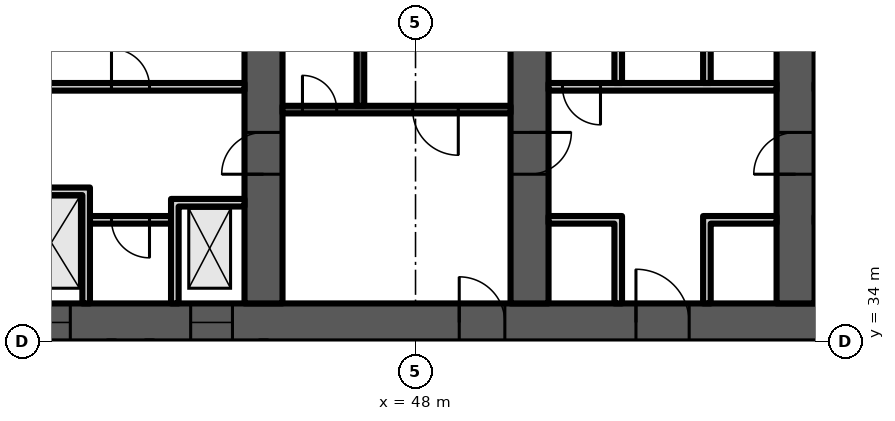
"""IFC4 building model, lengths in metres.
Left out: names, types, materials, properties, quantities, classifications, styles, units other than length and angle.
Written with IfcOpenShell. Run it as: python <this file> out.ifc"""

import sys

from ifc_helpers import new_model, si_unit, direction, frame, frame_2d, origin, place, context, subcontext, project, spatial, polyline, rectangle, outline, extrude, element, fill, save


model = new_model("IFC4")
c1 = context("Model", 3, precision=1e-05, world=origin(), true_north=direction((0.0, 1.0)))
c2 = subcontext(c1, "Body", "Model", "MODEL_VIEW")
j1 = project(units=[si_unit("LENGTHUNIT", "METRE"), si_unit("PLANEANGLEUNIT", "RADIAN")], contexts=[c1])
p1 = place(None, origin())
s1 = spatial("IfcSite", under=j1, at=p1, CompositionType="ELEMENT")
p2 = place(p1, origin())
s2 = spatial("IfcBuilding", under=s1, at=p2, CompositionType="ELEMENT")
p3 = place(p2, frame((0.0, 0.0, 121.9)))
s3 = spatial("IfcBuildingStorey", under=s2, at=p3, CompositionType="ELEMENT", Elevation=121.9)
p4 = place(p3, frame((16.0, 34.5, 0.0), z_axis=(0.0, 0.0, 1.0), x_axis=(1.0, 0.0, 0.0)))
e1 = element("IfcWall", 1, at=p4, inside=s3, PredefinedType="SHEAR", context=c2, shape_type="SweptSolid", body=[
    extrude(rectangle(XDim=49.0, YDim=1.0, at=frame_2d((24.5, 0.0))), origin(), (0.0, 0.0, 1.0), 3.6),
])
p5 = place(p4, frame((1.2, 0.0, 0.0)))
e2 = element("IfcOpeningElement", 2, at=p5, cuts=e1, PredefinedType="OPENING", context=c2, shape_type="SweptSolid", body=[
    extrude(rectangle(XDim=1.1, YDim=2.1, at=frame_2d((0.55, 1.05))), frame((0.0, 0.51, 0.0), z_axis=(0.0, -1.0, 0.0), x_axis=(1.0, 0.0, 0.0)), (0.0, 0.0, 1.0), 1.02),
])
p6 = place(p4, frame((5.083, 0.0, 0.0)))
e3 = element("IfcOpeningElement", 3, at=p6, cuts=e1, PredefinedType="OPENING", context=c2, shape_type="SweptSolid", body=[
    extrude(rectangle(XDim=1.1, YDim=2.1, at=frame_2d((0.55, 1.05))), frame((0.0, 0.51, 0.0), z_axis=(0.0, -1.0, 0.0), x_axis=(1.0, 0.0, 0.0)), (0.0, 0.0, 1.0), 1.02),
])
p7 = place(p4, frame((2.933, 0.0, 0.0)))
e4 = element("IfcOpeningElement", 4, at=p7, cuts=e1, PredefinedType="OPENING", context=c2, shape_type="SweptSolid", body=[
    extrude(rectangle(XDim=1.4, YDim=2.1, at=frame_2d((0.7, 1.05))), frame((0.0, 0.51, 0.0), z_axis=(0.0, -1.0, 0.0), x_axis=(1.0, 0.0, 0.0)), (0.0, 0.0, 1.0), 1.02),
])
p8 = place(p4, frame((7.65, 0.0, 0.0)))
e5 = element("IfcOpeningElement", 5, at=p8, cuts=e1, PredefinedType="OPENING", context=c2, shape_type="SweptSolid", body=[
    extrude(rectangle(XDim=1.2, YDim=2.1, at=frame_2d((0.6, 1.05))), frame((0.0, 0.51, 0.0), z_axis=(0.0, -1.0, 0.0), x_axis=(1.0, 0.0, 0.0)), (0.0, 0.0, 1.0), 1.02),
])
p9 = place(p4, frame((14.817, 0.0, 0.0)))
e6 = element("IfcOpeningElement", 6, at=p9, cuts=e1, PredefinedType="OPENING", context=c2, shape_type="SweptSolid", body=[
    extrude(rectangle(XDim=1.1, YDim=2.1, at=frame_2d((0.55, 1.05))), frame((0.0, 0.51, 0.0), z_axis=(0.0, -1.0, 0.0), x_axis=(1.0, 0.0, 0.0)), (0.0, 0.0, 1.0), 1.02),
])
p10 = place(p4, frame((19.083, 0.0, 0.0)))
e7 = element("IfcOpeningElement", 7, at=p10, cuts=e1, PredefinedType="OPENING", context=c2, shape_type="SweptSolid", body=[
    extrude(rectangle(XDim=1.1, YDim=2.1, at=frame_2d((0.55, 1.05))), frame((0.0, 0.51, 0.0), z_axis=(0.0, -1.0, 0.0), x_axis=(1.0, 0.0, 0.0)), (0.0, 0.0, 1.0), 1.02),
])
p11 = place(p4, frame((16.8, 0.0, 0.0)))
e8 = element("IfcOpeningElement", 8, at=p11, cuts=e1, PredefinedType="OPENING", context=c2, shape_type="SweptSolid", body=[
    extrude(rectangle(XDim=1.4, YDim=2.1, at=frame_2d((0.7, 1.05))), frame((0.0, 0.51, 0.0), z_axis=(0.0, -1.0, 0.0), x_axis=(1.0, 0.0, 0.0)), (0.0, 0.0, 1.0), 1.02),
])
p12 = place(p4, frame((21.817, 0.0, 0.0)))
e9 = element("IfcOpeningElement", 9, at=p12, cuts=e1, PredefinedType="OPENING", context=c2, shape_type="SweptSolid", body=[
    extrude(rectangle(XDim=1.1, YDim=2.1, at=frame_2d((0.55, 1.05))), frame((0.0, 0.51, 0.0), z_axis=(0.0, -1.0, 0.0), x_axis=(1.0, 0.0, 0.0)), (0.0, 0.0, 1.0), 1.02),
])
p13 = place(p4, frame((26.083, 0.0, 0.0)))
e10 = element("IfcOpeningElement", 10, at=p13, cuts=e1, PredefinedType="OPENING", context=c2, shape_type="SweptSolid", body=[
    extrude(rectangle(XDim=1.1, YDim=2.1, at=frame_2d((0.55, 1.05))), frame((0.0, 0.51, 0.0), z_axis=(0.0, -1.0, 0.0), x_axis=(1.0, 0.0, 0.0)), (0.0, 0.0, 1.0), 1.02),
])
p14 = place(p4, frame((33.15, 0.0, 0.0)))
e11 = element("IfcOpeningElement", 11, at=p14, cuts=e1, PredefinedType="OPENING", context=c2, shape_type="SweptSolid", body=[
    extrude(rectangle(XDim=1.2, YDim=2.1, at=frame_2d((0.6, 1.05))), frame((0.0, 0.51, 0.0), z_axis=(0.0, -1.0, 0.0), x_axis=(1.0, 0.0, 0.0)), (0.0, 0.0, 1.0), 1.02),
])
p15 = place(p4, frame((37.8, 0.0, 0.0)))
e12 = element("IfcOpeningElement", 12, at=p15, cuts=e1, PredefinedType="OPENING", context=c2, shape_type="SweptSolid", body=[
    extrude(rectangle(XDim=1.4, YDim=2.1, at=frame_2d((0.7, 1.05))), frame((0.0, 0.51, 0.0), z_axis=(0.0, -1.0, 0.0), x_axis=(1.0, 0.0, 0.0)), (0.0, 0.0, 1.0), 1.02),
])
p16 = place(p4, frame((42.817, 0.0, 0.0)))
e13 = element("IfcOpeningElement", 13, at=p16, cuts=e1, PredefinedType="OPENING", context=c2, shape_type="SweptSolid", body=[
    extrude(rectangle(XDim=1.1, YDim=2.1, at=frame_2d((0.55, 1.05))), frame((0.0, 0.51, 0.0), z_axis=(0.0, -1.0, 0.0), x_axis=(1.0, 0.0, 0.0)), (0.0, 0.0, 1.0), 1.02),
])
p17 = place(p4, frame((46.7, 0.0, 0.0)))
e14 = element("IfcOpeningElement", 14, at=p17, cuts=e1, PredefinedType="OPENING", context=c2, shape_type="SweptSolid", body=[
    extrude(rectangle(XDim=1.1, YDim=2.1, at=frame_2d((0.55, 1.05))), frame((0.0, 0.51, 0.0), z_axis=(0.0, -1.0, 0.0), x_axis=(1.0, 0.0, 0.0)), (0.0, 0.0, 1.0), 1.02),
])
p18 = place(p4, frame((44.667, 0.0, 0.0)))
e15 = element("IfcOpeningElement", 15, at=p18, cuts=e1, PredefinedType="OPENING", context=c2, shape_type="SweptSolid", body=[
    extrude(rectangle(XDim=1.4, YDim=2.1, at=frame_2d((0.7, 1.05))), frame((0.0, 0.51, 0.0), z_axis=(0.0, -1.0, 0.0), x_axis=(1.0, 0.0, 0.0)), (0.0, 0.0, 1.0), 1.02),
])
p19 = place(p3, frame((44.0, 35.0, 0.0), z_axis=(0.0, 0.0, 1.0), x_axis=(0.0, 1.0, 0.0)))
e16 = element("IfcWall", 16, at=p19, inside=s3, PredefinedType="SHEAR", context=c2, shape_type="SweptSolid", body=[
    extrude(rectangle(XDim=14.577, YDim=1.0, at=frame_2d((7.289, 0.0))), origin(), (0.0, 0.0, 1.0), 3.6),
])
p20 = place(p19, frame((3.4, 0.0, 0.0)))
e17 = element("IfcOpeningElement", 17, at=p20, cuts=e16, PredefinedType="OPENING", context=c2, shape_type="SweptSolid", body=[
    extrude(rectangle(XDim=1.1, YDim=2.1, at=frame_2d((0.55, 1.05))), frame((0.0, 0.51, 0.0), z_axis=(0.0, -1.0, 0.0), x_axis=(1.0, 0.0, 0.0)), (0.0, 0.0, 1.0), 1.02),
])
p21 = place(p19, frame((9.8, 0.0, 0.0)))
e18 = element("IfcOpeningElement", 18, at=p21, cuts=e16, PredefinedType="OPENING", context=c2, shape_type="SweptSolid", body=[
    extrude(rectangle(XDim=1.0, YDim=2.1, at=frame_2d((0.5, 1.05))), frame((0.0, 0.51, 0.0), z_axis=(0.0, -1.0, 0.0), x_axis=(1.0, 0.0, 0.0)), (0.0, 0.0, 1.0), 1.02),
])
p22 = place(p3, frame((51.0, 35.0, 0.0), z_axis=(0.0, 0.0, 1.0), x_axis=(0.0, 1.0, 0.0)))
e19 = element("IfcWall", 19, at=p22, inside=s3, PredefinedType="SHEAR", context=c2, shape_type="SweptSolid", body=[
    extrude(rectangle(XDim=13.965, YDim=1.0, at=frame_2d((6.982, 0.0))), origin(), (0.0, 0.0, 1.0), 3.6),
])
p23 = place(p22, frame((3.4, 0.0, 0.0)))
e20 = element("IfcOpeningElement", 20, at=p23, cuts=e19, PredefinedType="OPENING", context=c2, shape_type="SweptSolid", body=[
    extrude(rectangle(XDim=1.1, YDim=2.1, at=frame_2d((0.55, 1.05))), frame((0.0, 0.51, 0.0), z_axis=(0.0, -1.0, 0.0), x_axis=(1.0, 0.0, 0.0)), (0.0, 0.0, 1.0), 1.02),
])
p24 = place(p3, frame((58.0, 35.0, 0.0), z_axis=(0.0, 0.0, 1.0), x_axis=(0.0, 1.0, 0.0)))
e21 = element("IfcWall", 21, at=p24, inside=s3, PredefinedType="SHEAR", context=c2, shape_type="SweptSolid", body=[
    extrude(rectangle(XDim=13.352, YDim=1.0, at=frame_2d((6.676, 0.0))), origin(), (0.0, 0.0, 1.0), 3.6),
])
p25 = place(p24, frame((10.426, 0.0, 0.0)))
e22 = element("IfcOpeningElement", 22, at=p25, cuts=e21, PredefinedType="OPENING", context=c2, shape_type="SweptSolid", body=[
    extrude(rectangle(XDim=1.0, YDim=2.1, at=frame_2d((0.5, 1.05))), frame((0.0, 0.51, 0.0), z_axis=(0.0, -1.0, 0.0), x_axis=(1.0, 0.0, 0.0)), (0.0, 0.0, 1.0), 1.02),
])
p26 = place(p24, frame((3.4, 0.0, 0.0)))
e23 = element("IfcOpeningElement", 23, at=p26, cuts=e21, PredefinedType="OPENING", context=c2, shape_type="SweptSolid", body=[
    extrude(rectangle(XDim=1.1, YDim=2.1, at=frame_2d((0.55, 1.05))), frame((0.0, 0.51, 0.0), z_axis=(0.0, -1.0, 0.0), x_axis=(1.0, 0.0, 0.0)), (0.0, 0.0, 1.0), 1.02),
])
p27 = place(p3, frame((39.433, 37.2, 0.0), z_axis=(0.0, 0.0, 1.0), x_axis=(1.0, 0.0, 0.0)))
e24 = element("IfcWall", 24, at=p27, inside=s3, PredefinedType="PARTITIONING", context=c2, shape_type="SweptSolid", body=[
    extrude(rectangle(XDim=2.133, YDim=0.2, at=frame_2d((1.067, 0.0))), origin(), (0.0, 0.0, 1.0), 3.2),
])
p28 = place(p27, frame((0.567, 0.0, 0.0)))
e25 = element("IfcOpeningElement", 25, at=p28, cuts=e24, PredefinedType="OPENING", context=c2, shape_type="SweptSolid", body=[
    extrude(rectangle(XDim=1.0, YDim=2.1, at=frame_2d((0.5, 1.05))), frame((0.0, 0.11, 0.0), z_axis=(0.0, -1.0, 0.0), x_axis=(1.0, 0.0, 0.0)), (0.0, 0.0, 1.0), 0.22),
])
p29 = place(p3, frame((37.5, 40.7, 0.0), z_axis=(0.0, 0.0, 1.0), x_axis=(1.0, 0.0, 0.0)))
e26 = element("IfcWall", 26, at=p29, inside=s3, PredefinedType="PARTITIONING", context=c2, shape_type="SweptSolid", body=[
    extrude(rectangle(XDim=6.0, YDim=0.2, at=frame_2d((3.0, 0.0))), origin(), (0.0, 0.0, 1.0), 3.2),
])
p30 = place(p29, frame((2.5, 0.0, 0.0)))
e27 = element("IfcOpeningElement", 27, at=p30, cuts=e26, PredefinedType="OPENING", context=c2, shape_type="SweptSolid", body=[
    extrude(rectangle(XDim=1.0, YDim=2.1, at=frame_2d((0.5, 1.05))), frame((0.0, 0.11, 0.0), z_axis=(0.0, -1.0, 0.0), x_axis=(1.0, 0.0, 0.0)), (0.0, 0.0, 1.0), 0.22),
])
p31 = place(p3, origin())
e28 = element("IfcWall", 28, at=p31, inside=s3, PredefinedType="PARTITIONING", context=c2, shape_type="SweptSolid", body=[
    extrude(outline(polyline([(41.567, 37.75), (41.767, 37.75), (43.5, 37.75), (43.5, 37.55), (41.767, 37.55), (41.767, 35.0), (41.567, 35.0), (41.567, 37.75)])), origin(), (0.0, 0.0, 1.0), 3.2),
])
p32 = place(p3, origin())
e29 = element("IfcWall", 29, at=p32, inside=s3, PredefinedType="PARTITIONING", context=c2, shape_type="SweptSolid", body=[
    extrude(outline(polyline([(39.233, 37.85), (37.5, 37.85), (37.5, 38.05), (39.233, 38.05), (39.433, 38.05), (39.433, 35.0), (39.233, 35.0), (39.233, 37.85)])), origin(), (0.0, 0.0, 1.0), 3.2),
])
p33 = place(p3, frame((44.5, 40.1, 0.0), z_axis=(0.0, 0.0, 1.0), x_axis=(1.0, 0.0, 0.0)))
e30 = element("IfcWall", 30, at=p33, inside=s3, PredefinedType="SHEAR", context=c2, shape_type="SweptSolid", body=[
    extrude(rectangle(XDim=6.0, YDim=0.2, at=frame_2d((3.0, 0.0))), origin(), (0.0, 0.0, 1.0), 3.2),
])
p34 = place(p33, frame((3.425, 0.0, 0.0)))
e31 = element("IfcOpeningElement", 31, at=p34, cuts=e30, PredefinedType="OPENING", context=c2, shape_type="SweptSolid", body=[
    extrude(rectangle(XDim=1.2, YDim=2.1, at=frame_2d((0.6, 1.05))), frame((0.0, 0.11, 0.0), z_axis=(0.0, -1.0, 0.0), x_axis=(1.0, 0.0, 0.0)), (0.0, 0.0, 1.0), 0.22),
])
p35 = place(p33, frame((0.525, 0.0, 0.0)))
e32 = element("IfcOpeningElement", 32, at=p35, cuts=e30, PredefinedType="OPENING", context=c2, shape_type="SweptSolid", body=[
    extrude(rectangle(XDim=0.9, YDim=2.1, at=frame_2d((0.45, 1.05))), frame((0.0, 0.11, 0.0), z_axis=(0.0, -1.0, 0.0), x_axis=(1.0, 0.0, 0.0)), (0.0, 0.0, 1.0), 0.22),
])
p36 = place(p3, frame((46.55, 40.2, 0.0), z_axis=(0.0, 0.0, 1.0), x_axis=(0.0, 1.0, 0.0)))
e33 = element("IfcWall", 33, at=p36, inside=s3, PredefinedType="SHEAR", context=c2, shape_type="SweptSolid", body=[
    extrude(rectangle(XDim=7.2, YDim=0.2, at=frame_2d((3.6, 0.0))), origin(), (0.0, 0.0, 1.0), 3.2),
])
p37 = place(p3, frame((51.5, 40.7, 0.0), z_axis=(0.0, 0.0, 1.0), x_axis=(1.0, 0.0, 0.0)))
e34 = element("IfcWall", 34, at=p37, inside=s3, PredefinedType="PARTITIONING", context=c2, shape_type="SweptSolid", body=[
    extrude(rectangle(XDim=6.0, YDim=0.2, at=frame_2d((3.0, 0.0))), origin(), (0.0, 0.0, 1.0), 3.2),
])
p38 = place(p37, frame((0.367, 0.0, 0.0)))
e35 = element("IfcOpeningElement", 35, at=p38, cuts=e34, PredefinedType="OPENING", context=c2, shape_type="SweptSolid", body=[
    extrude(rectangle(XDim=1.0, YDim=2.1, at=frame_2d((0.5, 1.05))), frame((0.0, 0.11, 0.0), z_axis=(0.0, -1.0, 0.0), x_axis=(1.0, 0.0, 0.0)), (0.0, 0.0, 1.0), 0.22),
])
p39 = place(p3, origin())
e36 = element("IfcWall", 36, at=p39, inside=s3, PredefinedType="PARTITIONING", context=c2, shape_type="SweptSolid", body=[
    extrude(outline(polyline([(53.233, 37.1), (51.5, 37.1), (51.5, 37.3), (53.233, 37.3), (53.433, 37.3), (53.433, 35.0), (53.233, 35.0), (53.233, 37.1)])), origin(), (0.0, 0.0, 1.0), 3.2),
])
p40 = place(p3, origin())
e37 = element("IfcWall", 37, at=p40, inside=s3, PredefinedType="PARTITIONING", context=c2, shape_type="SweptSolid", body=[
    extrude(outline(polyline([(55.567, 37.3), (55.767, 37.3), (57.5, 37.3), (57.5, 37.1), (55.767, 37.1), (55.767, 35.0), (55.567, 35.0), (55.567, 37.3)])), origin(), (0.0, 0.0, 1.0), 3.2),
])
p41 = place(p3, origin())
e38 = element("IfcWall", 38, at=p41, inside=s3, PredefinedType="PARTITIONING", context=c2, shape_type="SweptSolid", body=[
    extrude(outline(polyline([(53.233, 40.8), (53.233, 43.8), (53.433, 43.8), (53.433, 40.8), (53.233, 40.8)])), origin(), (0.0, 0.0, 1.0), 3.2),
])
p42 = place(p3, origin())
e39 = element("IfcWall", 39, at=p42, inside=s3, PredefinedType="PARTITIONING", context=c2, shape_type="SweptSolid", body=[
    extrude(outline(polyline([(55.567, 40.8), (55.567, 43.8), (55.767, 43.8), (55.767, 40.8), (55.567, 40.8)])), origin(), (0.0, 0.0, 1.0), 3.2),
])
p43 = place(p28, origin())
e40 = element("IfcDoor", 40, at=p43, inside=s3, OperationType="SINGLE_SWING_RIGHT", PredefinedType="DOOR", context=c2, shape_type="SweptSolid", body=[
    extrude(rectangle(XDim=1.0, YDim=2.1, at=frame_2d((0.5, 1.05))), frame((0.0, 0.025, 0.0), z_axis=(0.0, -1.0, 0.0), x_axis=(1.0, 0.0, 0.0)), (0.0, 0.0, 1.0), 0.05),
])
fill(e25, e40)
p44 = place(p12, origin())
e41 = element("IfcDoor", 41, at=p44, inside=s3, OperationType="DOUBLE_DOOR_SLIDING", PredefinedType="DOOR", context=c2, shape_type="SweptSolid", body=[
    extrude(rectangle(XDim=1.1, YDim=2.1, at=frame_2d((0.55, 1.05))), frame((0.0, 0.025, 0.0), z_axis=(0.0, -1.0, 0.0), x_axis=(1.0, 0.0, 0.0)), (0.0, 0.0, 1.0), 0.05),
])
fill(e9, e41)
p45 = place(p13, origin())
e42 = element("IfcDoor", 42, at=p45, inside=s3, OperationType="DOUBLE_DOOR_SLIDING", PredefinedType="DOOR", context=c2, shape_type="SweptSolid", body=[
    extrude(rectangle(XDim=1.1, YDim=2.1, at=frame_2d((0.55, 1.05))), frame((0.0, 0.025, 0.0), z_axis=(0.0, -1.0, 0.0), x_axis=(1.0, 0.0, 0.0)), (0.0, 0.0, 1.0), 0.05),
])
fill(e10, e42)
p46 = place(p30, origin())
e43 = element("IfcDoor", 43, at=p46, inside=s3, OperationType="SINGLE_SWING_LEFT", PredefinedType="DOOR", context=c2, shape_type="SweptSolid", body=[
    extrude(rectangle(XDim=1.0, YDim=2.1, at=frame_2d((0.5, 1.05))), frame((0.0, 0.025, 0.0), z_axis=(0.0, -1.0, 0.0), x_axis=(1.0, 0.0, 0.0)), (0.0, 0.0, 1.0), 0.05),
])
fill(e27, e43)
p47 = place(p34, origin())
e44 = element("IfcDoor", 44, at=p47, inside=s3, OperationType="SINGLE_SWING_RIGHT", PredefinedType="DOOR", context=c2, shape_type="SweptSolid", body=[
    extrude(rectangle(XDim=1.2, YDim=2.1, at=frame_2d((0.6, 1.05))), frame((0.0, 0.025, 0.0), z_axis=(0.0, -1.0, 0.0), x_axis=(1.0, 0.0, 0.0)), (0.0, 0.0, 1.0), 0.05),
])
fill(e31, e44)
p48 = place(p35, origin())
e45 = element("IfcDoor", 45, at=p48, inside=s3, OperationType="SINGLE_SWING_LEFT", PredefinedType="DOOR", context=c2, shape_type="SweptSolid", body=[
    extrude(rectangle(XDim=0.9, YDim=2.1, at=frame_2d((0.45, 1.05))), frame((0.0, 0.025, 0.0), z_axis=(0.0, -1.0, 0.0), x_axis=(1.0, 0.0, 0.0)), (0.0, 0.0, 1.0), 0.05),
])
fill(e32, e45)
p49 = place(p14, origin())
e46 = element("IfcDoor", 46, at=p49, inside=s3, OperationType="SINGLE_SWING_LEFT", PredefinedType="DOOR", context=c2, shape_type="SweptSolid", body=[
    extrude(rectangle(XDim=1.2, YDim=2.1, at=frame_2d((0.6, 1.05))), frame((0.0, 0.025, 0.0), z_axis=(0.0, -1.0, 0.0), x_axis=(1.0, 0.0, 0.0)), (0.0, 0.0, 1.0), 0.05),
])
fill(e11, e46)
p50 = place(p15, origin())
e47 = element("IfcDoor", 47, at=p50, inside=s3, OperationType="DOUBLE_DOOR_SINGLE_SWING", PredefinedType="DOOR", context=c2, shape_type="SweptSolid", body=[
    extrude(rectangle(XDim=1.4, YDim=2.1, at=frame_2d((0.7, 1.05))), frame((0.0, 0.025, 0.0), z_axis=(0.0, -1.0, 0.0), x_axis=(1.0, 0.0, 0.0)), (0.0, 0.0, 1.0), 0.05),
])
fill(e12, e47)
p51 = place(p38, origin())
e48 = element("IfcDoor", 48, at=p51, inside=s3, OperationType="SINGLE_SWING_RIGHT", PredefinedType="DOOR", context=c2, shape_type="SweptSolid", body=[
    extrude(rectangle(XDim=1.0, YDim=2.1, at=frame_2d((0.5, 1.05))), frame((0.0, 0.025, 0.0), z_axis=(0.0, -1.0, 0.0), x_axis=(1.0, 0.0, 0.0)), (0.0, 0.0, 1.0), 0.05),
])
fill(e35, e48)
p52 = place(p20, origin())
e49 = element("IfcDoor", 49, at=p52, inside=s3, OperationType="SINGLE_SWING_LEFT", PredefinedType="DOOR", context=c2, shape_type="SweptSolid", body=[
    extrude(rectangle(XDim=1.1, YDim=2.1, at=frame_2d((0.55, 1.05))), frame((0.0, 0.025, 0.0), z_axis=(0.0, -1.0, 0.0), x_axis=(1.0, 0.0, 0.0)), (0.0, 0.0, 1.0), 0.05),
])
fill(e17, e49)
p53 = place(p23, origin())
e50 = element("IfcDoor", 50, at=p53, inside=s3, OperationType="SINGLE_SWING_RIGHT", PredefinedType="DOOR", context=c2, shape_type="SweptSolid", body=[
    extrude(rectangle(XDim=1.1, YDim=2.1, at=frame_2d((0.55, 1.05))), frame((0.0, 0.025, 0.0), z_axis=(0.0, -1.0, 0.0), x_axis=(1.0, 0.0, 0.0)), (0.0, 0.0, 1.0), 0.05),
])
fill(e20, e50)
p54 = place(p26, origin())
e51 = element("IfcDoor", 51, at=p54, inside=s3, OperationType="SINGLE_SWING_LEFT", PredefinedType="DOOR", context=c2, shape_type="SweptSolid", body=[
    extrude(rectangle(XDim=1.1, YDim=2.1, at=frame_2d((0.55, 1.05))), frame((0.0, 0.025, 0.0), z_axis=(0.0, -1.0, 0.0), x_axis=(1.0, 0.0, 0.0)), (0.0, 0.0, 1.0), 0.05),
])
fill(e23, e51)
save(model, sys.argv[1])
